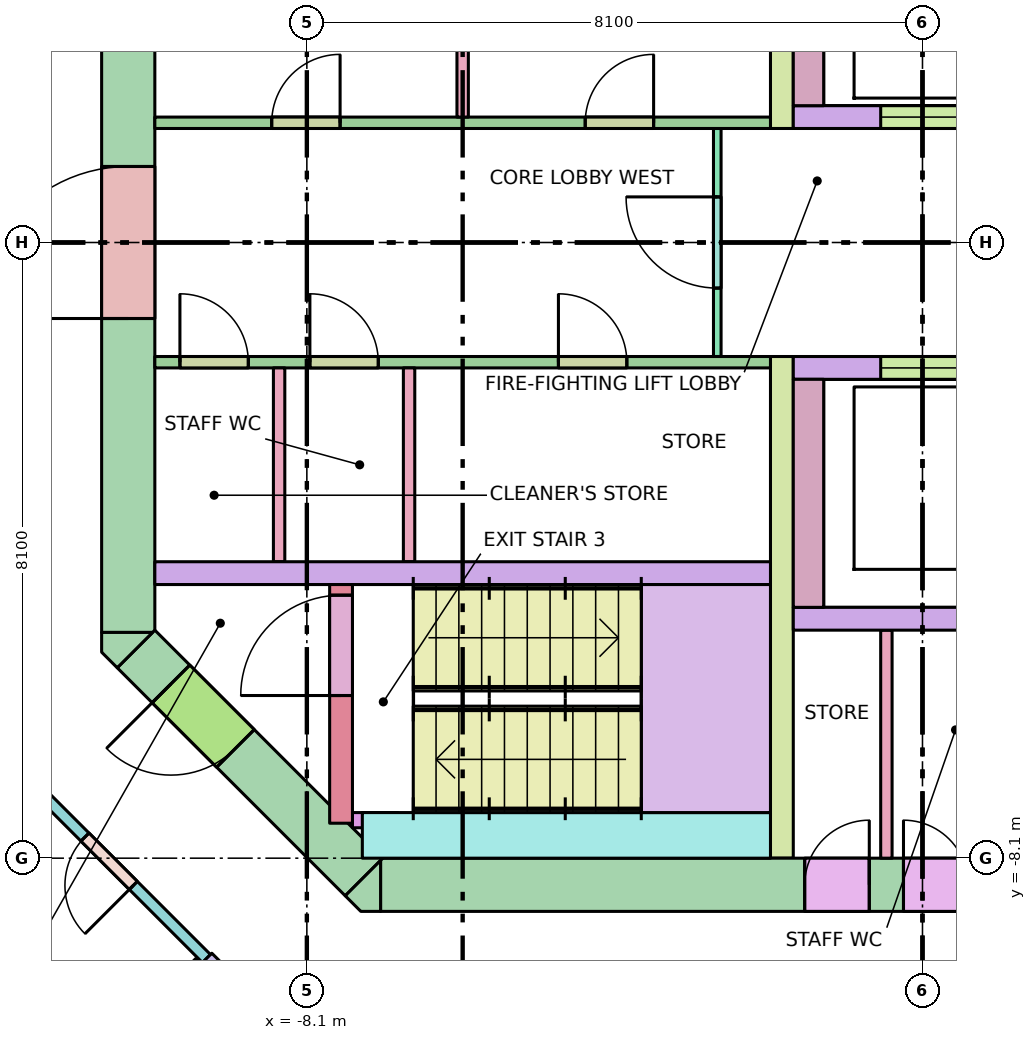
"""IFC4 building model, lengths in metres.
Left out: names, types, materials, properties, quantities, classifications, styles, units other than length and angle.
Written with IfcOpenShell. Run it as: python <this file> out.ifc"""

import sys

from ifc_helpers import new_model, si_unit, direction, frame, frame_2d, origin, place, context, subcontext, project, spatial, polyline, rectangle, outline, extrude, element, fill, save


model = new_model("IFC4")
c1 = context("Model", 3, precision=1e-05, world=origin(), true_north=direction((0.0, 1.0)))
c2 = subcontext(c1, "Body", "Model", "MODEL_VIEW")
j1 = project(units=[si_unit("LENGTHUNIT", "METRE"), si_unit("PLANEANGLEUNIT", "RADIAN")], contexts=[c1])
p1 = place(None, origin())
s1 = spatial("IfcSite", under=j1, at=p1, CompositionType="ELEMENT")
p2 = place(p1, origin())
s2 = spatial("IfcBuilding", under=s1, at=p2, CompositionType="ELEMENT")
p3 = place(p2, frame((0.0, 0.0, 215.0)))
s3 = spatial("IfcBuildingStorey", under=s2, at=p3, CompositionType="ELEMENT", Elevation=215.0)
p4 = place(p3, frame((-7.13, -8.45, -0.28), z_axis=(0.0, 0.0, 1.0), x_axis=(1.0, 0.0, 0.0)))
e1 = element("IfcWall", 1, at=p4, inside=s3, PredefinedType="SHEAR", context=c2, shape_type="SweptSolid", body=[
    extrude(rectangle(XDim=14.26, YDim=0.7, at=frame_2d((7.13, 0.0))), origin(), (0.0, 0.0, 1.0), 3.7),
])
p5 = place(p4, frame((8.08, 0.0, 0.28)))
e2 = element("IfcOpeningElement", 2, at=p5, cuts=e1, PredefinedType="OPENING", context=c2, shape_type="SweptSolid", body=[
    extrude(rectangle(XDim=0.7, YDim=2.1, at=frame_2d((0.35, 1.05))), frame((0.0, 0.36, 0.0), z_axis=(0.0, -1.0, 0.0), x_axis=(1.0, 0.0, 0.0)), (0.0, 0.0, 1.0), 0.72),
])
p6 = place(p4, frame((5.58, 0.0, 0.28)))
e3 = element("IfcOpeningElement", 3, at=p6, cuts=e1, PredefinedType="OPENING", context=c2, shape_type="SweptSolid", body=[
    extrude(rectangle(XDim=0.85, YDim=2.1, at=frame_2d((0.425, 1.05))), frame((0.0, 0.36, 0.0), z_axis=(0.0, -1.0, 0.0), x_axis=(1.0, 0.0, 0.0)), (0.0, 0.0, 1.0), 0.72),
])
p7 = place(p4, frame((6.88, 0.0, 0.28)))
e4 = element("IfcOpeningElement", 4, at=p7, cuts=e1, PredefinedType="OPENING", context=c2, shape_type="SweptSolid", body=[
    extrude(rectangle(XDim=0.85, YDim=2.1, at=frame_2d((0.425, 1.05))), frame((0.0, 0.36, 0.0), z_axis=(0.0, -1.0, 0.0), x_axis=(1.0, 0.0, 0.0)), (0.0, 0.0, 1.0), 0.72),
])
p8 = place(p4, frame((9.521, 0.0, 0.28)))
e5 = element("IfcOpeningElement", 5, at=p8, cuts=e1, PredefinedType="OPENING", context=c2, shape_type="SweptSolid", body=[
    extrude(rectangle(XDim=0.9, YDim=2.1, at=frame_2d((0.45, 1.05))), frame((0.0, 0.36, 0.0), z_axis=(0.0, -1.0, 0.0), x_axis=(1.0, 0.0, 0.0)), (0.0, 0.0, 1.0), 0.72),
])
p9 = place(p4, frame((11.278, 0.0, 0.28)))
e6 = element("IfcOpeningElement", 6, at=p9, cuts=e1, PredefinedType="OPENING", context=c2, shape_type="SweptSolid", body=[
    extrude(rectangle(XDim=0.9, YDim=2.1, at=frame_2d((0.45, 1.05))), frame((0.0, 0.36, 0.0), z_axis=(0.0, -1.0, 0.0), x_axis=(1.0, 0.0, 0.0)), (0.0, 0.0, 1.0), 0.72),
])
p10 = place(p4, frame((12.84, 0.0, 0.28)))
e7 = element("IfcOpeningElement", 7, at=p10, cuts=e1, PredefinedType="OPENING", context=c2, shape_type="SweptSolid", body=[
    extrude(rectangle(XDim=0.9, YDim=2.1, at=frame_2d((0.45, 1.05))), frame((0.0, 0.36, 0.0), z_axis=(0.0, -1.0, 0.0), x_axis=(1.0, 0.0, 0.0)), (0.0, 0.0, 1.0), 0.72),
])
p11 = place(p3, frame((-10.45, -5.13, -0.28), z_axis=(0.0, 0.0, 1.0), x_axis=(0.0, 1.0, 0.0)))
e8 = element("IfcWall", 8, at=p11, inside=s3, PredefinedType="SHEAR", context=c2, shape_type="SweptSolid", body=[
    extrude(rectangle(XDim=10.26, YDim=0.7, at=frame_2d((5.13, 0.0))), origin(), (0.0, 0.0, 1.0), 3.7),
])
p12 = place(p11, frame((4.13, 0.0, 0.28)))
e9 = element("IfcOpeningElement", 9, at=p12, cuts=e8, PredefinedType="OPENING", context=c2, shape_type="SweptSolid", body=[
    extrude(rectangle(XDim=2.0, YDim=2.1, at=frame_2d((1.0, 1.05))), frame((0.0, 0.36, 0.0), z_axis=(0.0, -1.0, 0.0), x_axis=(1.0, 0.0, 0.0)), (0.0, 0.0, 1.0), 0.72),
])
p13 = place(p3, frame((-7.347, -8.347, -0.28), z_axis=(0.0, 0.0, 1.0), x_axis=(-0.707106781187, 0.707106781187, 0.0)))
e10 = element("IfcWall", 10, at=p13, inside=s3, PredefinedType="SHEAR", context=c2, shape_type="SweptSolid", body=[
    extrude(rectangle(XDim=4.243, YDim=0.7, at=frame_2d((2.121, 0.0))), origin(), (0.0, 0.0, 1.0), 3.7),
])
p14 = place(p13, frame((2.393, 0.0, 0.28)))
e11 = element("IfcOpeningElement", 11, at=p14, cuts=e10, PredefinedType="OPENING", context=c2, shape_type="SweptSolid", body=[
    extrude(rectangle(XDim=1.2, YDim=2.1, at=frame_2d((0.6, 1.05))), frame((0.0, 0.36, 0.0), z_axis=(0.0, -1.0, 0.0), x_axis=(1.0, 0.0, 0.0)), (0.0, 0.0, 1.0), 0.72),
])
p15 = place(p3, frame((0.0, 0.0, -0.28)))
e12 = element("IfcWall", 12, at=p15, inside=s3, PredefinedType="SHEAR", context=c2, shape_type="SweptSolid", body=[
    extrude(outline(polyline([(-7.39, -8.8), (-7.595, -8.595), (-7.595, -8.595), (-7.595, -8.595), (-7.13, -8.13), (-7.13, -8.8), (-7.13, -8.8), (-7.39, -8.8)])), origin(), (0.0, 0.0, 1.0), 3.7),
])
p16 = place(p3, frame((0.0, 0.0, -0.28)))
e13 = element("IfcWall", 13, at=p16, inside=s3, PredefinedType="SHEAR", context=c2, shape_type="SweptSolid", body=[
    extrude(outline(polyline([(-10.8, -5.39), (-10.8, -5.13), (-10.8, -5.13), (-10.13, -5.13), (-10.595, -5.595), (-10.595, -5.595), (-10.595, -5.595), (-10.8, -5.39)])), origin(), (0.0, 0.0, 1.0), 3.7),
])
p17 = place(p3, frame((-10.1, -4.35, 0.0), z_axis=(0.0, 0.0, 1.0), x_axis=(1.0, 0.0, 0.0)))
e14 = element("IfcWall", 14, at=p17, inside=s3, PredefinedType="SOLIDWALL", context=c2, shape_type="SweptSolid", body=[
    extrude(rectangle(XDim=8.1, YDim=0.3, at=frame_2d((4.05, 0.0))), origin(), (0.0, 0.0, 1.0), 3.42),
])
for number, where, z_axis, x_axis in (
    (15, (-1.85, 1.5, 0.0), (0.0, 0.0, 1.0), (0.0, 1.0, 0.0)),
    (16, (-1.85, -8.1, 0.0), (0.0, 0.0, 1.0), (0.0, 1.0, 0.0)),
):
    element("IfcWall", number, at=place(p3, frame(where, z_axis=z_axis, x_axis=x_axis)), inside=s3, PredefinedType="SHEAR", context=c2, shape_type="SweptSolid", body=[
        extrude(rectangle(XDim=6.6, YDim=0.3, at=frame_2d((3.3, 0.0))), origin(), (0.0, 0.0, 1.0), 3.42),
    ])
p18 = place(p3, frame((-1.7, 1.65, 0.0), z_axis=(0.0, 0.0, 1.0), x_axis=(1.0, 0.0, 0.0)))
e17 = element("IfcWall", 17, at=p18, inside=s3, PredefinedType="SOLIDWALL", context=c2, shape_type="SweptSolid", body=[
    extrude(rectangle(XDim=3.4, YDim=0.3, at=frame_2d((1.7, 0.0))), origin(), (0.0, 0.0, 1.0), 3.42),
])
p19 = place(p18, frame((1.15, 0.0, 0.0)))
e18 = element("IfcOpeningElement", 18, at=p19, cuts=e17, PredefinedType="OPENING", context=c2, shape_type="SweptSolid", body=[
    extrude(rectangle(XDim=1.1, YDim=2.1, at=frame_2d((0.55, 1.05))), frame((0.0, 0.16, 0.0), z_axis=(0.0, -1.0, 0.0), x_axis=(1.0, 0.0, 0.0)), (0.0, 0.0, 1.0), 0.32),
])
p20 = place(p3, frame((-1.7, -1.65, 0.0), z_axis=(0.0, 0.0, 1.0), x_axis=(1.0, 0.0, 0.0)))
e19 = element("IfcWall", 19, at=p20, inside=s3, PredefinedType="SOLIDWALL", context=c2, shape_type="SweptSolid", body=[
    extrude(rectangle(XDim=3.4, YDim=0.3, at=frame_2d((1.7, 0.0))), origin(), (0.0, 0.0, 1.0), 3.42),
])
p21 = place(p20, frame((1.15, 0.0, 0.0)))
e20 = element("IfcOpeningElement", 20, at=p21, cuts=e19, PredefinedType="OPENING", context=c2, shape_type="SweptSolid", body=[
    extrude(rectangle(XDim=1.1, YDim=2.1, at=frame_2d((0.55, 1.05))), frame((0.0, 0.16, 0.0), z_axis=(0.0, -1.0, 0.0), x_axis=(1.0, 0.0, 0.0)), (0.0, 0.0, 1.0), 0.32),
])
for number, where, z_axis, x_axis in (
    (21, (-1.5, 1.8, 0.0), (0.0, 0.0, 1.0), (0.0, 1.0, 0.0)),
    (22, (-1.5, -4.8, 0.0), (0.0, 0.0, 1.0), (0.0, 1.0, 0.0)),
):
    element("IfcWall", number, at=place(p3, frame(where, z_axis=z_axis, x_axis=x_axis)), inside=s3, PredefinedType="SOLIDWALL", context=c2, shape_type="SweptSolid", body=[
        extrude(rectangle(XDim=3.0, YDim=0.4, at=frame_2d((1.5, 0.0))), origin(), (0.0, 0.0, 1.0), 3.42),
    ])
p22 = place(p3, frame((-1.7, -4.95, 0.0), z_axis=(0.0, 0.0, 1.0), x_axis=(1.0, 0.0, 0.0)))
e23 = element("IfcWall", 23, at=p22, inside=s3, PredefinedType="SOLIDWALL", context=c2, shape_type="SweptSolid", body=[
    extrude(rectangle(XDim=3.4, YDim=0.3, at=frame_2d((1.7, 0.0))), origin(), (0.0, 0.0, 1.0), 3.42),
])
p23 = place(p3, frame((-7.65, -7.64, 0.0), z_axis=(0.0, 0.0, 1.0), x_axis=(0.0, 1.0, 0.0)))
e24 = element("IfcWall", 24, at=p23, inside=s3, PredefinedType="SHEAR", context=c2, shape_type="SweptSolid", body=[
    extrude(rectangle(XDim=3.14, YDim=0.3, at=frame_2d((1.57, 0.0))), origin(), (0.0, 0.0, 1.0), 3.42),
])
p24 = place(p23, frame((1.68, 0.0, 0.0)))
e25 = element("IfcOpeningElement", 25, at=p24, cuts=e24, PredefinedType="OPENING", context=c2, shape_type="SweptSolid", body=[
    extrude(rectangle(XDim=1.32, YDim=2.1, at=frame_2d((0.66, 1.05))), frame((0.0, 0.16, 0.0), z_axis=(0.0, -1.0, 0.0), x_axis=(1.0, 0.0, 0.0)), (0.0, 0.0, 1.0), 0.32),
])
p25 = place(p3, frame((-7.5, -7.6, 0.0), z_axis=(0.0, 0.0, 1.0), x_axis=(1.0, 0.0, 0.0)))
e26 = element("IfcWall", 26, at=p25, inside=s3, PredefinedType="SHEAR", context=c2, shape_type="SweptSolid", body=[
    extrude(rectangle(XDim=0.6, YDim=0.2, at=frame_2d((0.3, 0.0))), origin(), (0.0, 0.0, 1.0), 3.42),
])
p26 = place(p3, frame((-7.37, -7.8, 0.0), z_axis=(0.0, 0.0, 1.0), x_axis=(1.0, 0.0, 0.0)))
e27 = element("IfcWall", 27, at=p26, inside=s3, PredefinedType="SHEAR", context=c2, shape_type="SweptSolid", body=[
    extrude(rectangle(XDim=5.37, YDim=0.6, at=frame_2d((2.685, 0.0))), origin(), (0.0, 0.0, 1.0), 3.42),
])
p27 = place(p3, frame((-2.7, -1.5, 0.0), z_axis=(0.0, 0.0, 1.0), x_axis=(0.0, 1.0, 0.0)))
e28 = element("IfcWall", 28, at=p27, inside=s3, PredefinedType="PARTITIONING", context=c2, shape_type="SweptSolid", body=[
    extrude(rectangle(XDim=3.0, YDim=0.1, at=frame_2d((1.5, 0.0))), origin(), (0.0, 0.0, 1.0), 3.42),
])
p28 = place(p27, frame((0.9, 0.0, 0.0)))
e29 = element("IfcOpeningElement", 29, at=p28, cuts=e28, PredefinedType="OPENING", context=c2, shape_type="SweptSolid", body=[
    extrude(rectangle(XDim=1.2, YDim=2.1, at=frame_2d((0.6, 1.05))), frame((0.0, 0.06, 0.0), z_axis=(0.0, -1.0, 0.0), x_axis=(1.0, 0.0, 0.0)), (0.0, 0.0, 1.0), 0.12),
])
p29 = place(p3, frame((-0.475, -8.1, 0.0), z_axis=(0.0, 0.0, 1.0), x_axis=(0.0, 1.0, 0.0)))
e30 = element("IfcWall", 30, at=p29, inside=s3, PredefinedType="PARTITIONING", context=c2, shape_type="SweptSolid", body=[
    extrude(rectangle(XDim=3.0, YDim=0.15, at=frame_2d((1.5, 0.0))), origin(), (0.0, 0.0, 1.0), 3.42),
])
for number, where, z_axis, x_axis in (
    (31, (-6.05, 1.65, 0.0), (0.0, 0.0, 1.0), (0.0, 1.0, 0.0)),
    (32, (-8.465, -4.2, 0.0), (0.0, 0.0, 1.0), (0.0, 1.0, 0.0)),
    (33, (-6.755, -4.2, 0.0), (0.0, 0.0, 1.0), (0.0, 1.0, 0.0)),
):
    element("IfcWall", number, at=place(p3, frame(where, z_axis=z_axis, x_axis=x_axis)), inside=s3, PredefinedType="PARTITIONING", context=c2, shape_type="SweptSolid", body=[
        extrude(rectangle(XDim=2.55, YDim=0.15, at=frame_2d((1.275, 0.0))), origin(), (0.0, 0.0, 1.0), 3.42),
    ])
p30 = place(p3, frame((-10.1, 1.575, 0.0), z_axis=(0.0, 0.0, 1.0), x_axis=(1.0, 0.0, 0.0)))
e34 = element("IfcWall", 34, at=p30, inside=s3, PredefinedType="PARTITIONING", context=c2, shape_type="SweptSolid", body=[
    extrude(rectangle(XDim=8.1, YDim=0.15, at=frame_2d((4.05, 0.0))), origin(), (0.0, 0.0, 1.0), 3.42),
])
p31 = place(p30, frame((1.538, 0.0, 0.0)))
e35 = element("IfcOpeningElement", 35, at=p31, cuts=e34, PredefinedType="OPENING", context=c2, shape_type="SweptSolid", body=[
    extrude(rectangle(XDim=0.9, YDim=2.1, at=frame_2d((0.45, 1.05))), frame((0.0, 0.085, 0.0), z_axis=(0.0, -1.0, 0.0), x_axis=(1.0, 0.0, 0.0)), (0.0, 0.0, 1.0), 0.17),
])
p32 = place(p30, frame((5.663, 0.0, 0.0)))
e36 = element("IfcOpeningElement", 36, at=p32, cuts=e34, PredefinedType="OPENING", context=c2, shape_type="SweptSolid", body=[
    extrude(rectangle(XDim=0.9, YDim=2.1, at=frame_2d((0.45, 1.05))), frame((0.0, 0.085, 0.0), z_axis=(0.0, -1.0, 0.0), x_axis=(1.0, 0.0, 0.0)), (0.0, 0.0, 1.0), 0.17),
])
p33 = place(p3, frame((-10.1, -1.575, 0.0), z_axis=(0.0, 0.0, 1.0), x_axis=(1.0, 0.0, 0.0)))
e37 = element("IfcWall", 37, at=p33, inside=s3, PredefinedType="PARTITIONING", context=c2, shape_type="SweptSolid", body=[
    extrude(rectangle(XDim=8.1, YDim=0.15, at=frame_2d((4.05, 0.0))), origin(), (0.0, 0.0, 1.0), 3.42),
])
p34 = place(p33, frame((0.33, 0.0, 0.0)))
e38 = element("IfcOpeningElement", 38, at=p34, cuts=e37, PredefinedType="OPENING", context=c2, shape_type="SweptSolid", body=[
    extrude(rectangle(XDim=0.9, YDim=2.1, at=frame_2d((0.45, 1.05))), frame((0.0, 0.085, 0.0), z_axis=(0.0, -1.0, 0.0), x_axis=(1.0, 0.0, 0.0)), (0.0, 0.0, 1.0), 0.17),
])
p35 = place(p33, frame((2.04, 0.0, 0.0)))
e39 = element("IfcOpeningElement", 39, at=p35, cuts=e37, PredefinedType="OPENING", context=c2, shape_type="SweptSolid", body=[
    extrude(rectangle(XDim=0.9, YDim=2.1, at=frame_2d((0.45, 1.05))), frame((0.0, 0.085, 0.0), z_axis=(0.0, -1.0, 0.0), x_axis=(1.0, 0.0, 0.0)), (0.0, 0.0, 1.0), 0.17),
])
p36 = place(p33, frame((5.31, 0.0, 0.0)))
e40 = element("IfcOpeningElement", 40, at=p36, cuts=e37, PredefinedType="OPENING", context=c2, shape_type="SweptSolid", body=[
    extrude(rectangle(XDim=0.9, YDim=2.1, at=frame_2d((0.45, 1.05))), frame((0.0, 0.085, 0.0), z_axis=(0.0, -1.0, 0.0), x_axis=(1.0, 0.0, 0.0)), (0.0, 0.0, 1.0), 0.17),
])
p37 = place(p3, frame((-8.216, -10.625, 0.0), z_axis=(0.0, 0.0, 1.0), x_axis=(-0.70717842684, 0.707035128273, 0.0)))
e41 = element("IfcWall", 41, at=p37, inside=s3, PredefinedType="PARTITIONING", context=c2, shape_type="SweptSolid", body=[
    extrude(rectangle(XDim=1.704, YDim=0.2, at=frame_2d((0.852, 0.0))), origin(), (0.0, 0.0, 1.0), 2.52),
])
p38 = place(p37, frame((0.402, 0.0, 0.0)))
e42 = element("IfcOpeningElement", 42, at=p38, cuts=e41, PredefinedType="OPENING", context=c2, shape_type="SweptSolid", body=[
    extrude(rectangle(XDim=0.9, YDim=2.1, at=frame_2d((0.45, 1.05))), frame((0.0, 0.11, 0.0), z_axis=(0.0, -1.0, 0.0), x_axis=(1.0, 0.0, 0.0)), (0.0, 0.0, 1.0), 0.22),
])
p39 = place(p3, frame((-9.421, -9.421, 0.0), z_axis=(0.0, 0.0, 1.0), x_axis=(-0.707079950597, 0.707133610758, 0.0)))
e43 = element("IfcWall", 43, at=p39, inside=s3, PredefinedType="PARTITIONING", context=c2, shape_type="SweptSolid", body=[
    extrude(rectangle(XDim=4.55, YDim=0.15, at=frame_2d((2.275, 0.0))), origin(), (0.0, 0.0, 1.0), 2.52),
])
p40 = place(p39, frame((1.361, 0.0, 0.0)))
e44 = element("IfcOpeningElement", 44, at=p40, cuts=e43, PredefinedType="OPENING", context=c2, shape_type="SweptSolid", body=[
    extrude(rectangle(XDim=0.9, YDim=2.1, at=frame_2d((0.45, 1.05))), frame((0.0, 0.085, 0.0), z_axis=(0.0, -1.0, 0.0), x_axis=(1.0, 0.0, 0.0)), (0.0, 0.0, 1.0), 0.17),
])
p41 = place(p3, frame((-9.491, -9.491, 0.0), z_axis=(0.0, 0.0, 1.0), x_axis=(-0.707106781187, -0.707106781187, 0.0)))
e45 = element("IfcWall", 45, at=p41, inside=s3, PredefinedType="PARTITIONING", context=c2, shape_type="SweptSolid", body=[
    extrude(rectangle(XDim=5.914, YDim=0.2, at=frame_2d((2.957, 0.0))), origin(), (0.0, 0.0, 1.0), 2.52),
])
p42 = place(p19, origin())
e46 = element("IfcDoor", 46, at=p42, inside=s3, OperationType="DOUBLE_DOOR_SLIDING", PredefinedType="DOOR", context=c2, shape_type="SweptSolid", body=[
    extrude(rectangle(XDim=1.1, YDim=2.1, at=frame_2d((0.55, 1.05))), frame((0.0, 0.025, 0.0), z_axis=(0.0, -1.0, 0.0), x_axis=(1.0, 0.0, 0.0)), (0.0, 0.0, 1.0), 0.05),
])
fill(e18, e46)
p43 = place(p21, origin())
e47 = element("IfcDoor", 47, at=p43, inside=s3, OperationType="DOUBLE_DOOR_SLIDING", PredefinedType="DOOR", context=c2, shape_type="SweptSolid", body=[
    extrude(rectangle(XDim=1.1, YDim=2.1, at=frame_2d((0.55, 1.05))), frame((0.0, 0.025, 0.0), z_axis=(0.0, -1.0, 0.0), x_axis=(1.0, 0.0, 0.0)), (0.0, 0.0, 1.0), 0.05),
])
fill(e20, e47)
p44 = place(p24, origin())
e48 = element("IfcDoor", 48, at=p44, inside=s3, OperationType="DOUBLE_DOOR_SINGLE_SWING", PredefinedType="DOOR", context=c2, shape_type="SweptSolid", body=[
    extrude(rectangle(XDim=1.32, YDim=2.1, at=frame_2d((0.66, 1.05))), frame((0.0, 0.025, 0.0), z_axis=(0.0, -1.0, 0.0), x_axis=(1.0, 0.0, 0.0)), (0.0, 0.0, 1.0), 0.05),
])
fill(e25, e48)
p45 = place(p14, origin())
e49 = element("IfcDoor", 49, at=p45, inside=s3, OperationType="SINGLE_SWING_RIGHT", PredefinedType="DOOR", context=c2, shape_type="SweptSolid", body=[
    extrude(rectangle(XDim=1.2, YDim=2.1, at=frame_2d((0.6, 1.05))), frame((0.0, 0.025, 0.0), z_axis=(0.0, -1.0, 0.0), x_axis=(1.0, 0.0, 0.0)), (0.0, 0.0, 1.0), 0.05),
])
fill(e11, e49)
p46 = place(p12, origin())
e50 = element("IfcDoor", 50, at=p46, inside=s3, OperationType="DOUBLE_DOOR_SINGLE_SWING", PredefinedType="DOOR", context=c2, shape_type="SweptSolid", body=[
    extrude(rectangle(XDim=2.0, YDim=2.1, at=frame_2d((1.0, 1.05))), frame((0.0, 0.025, 0.0), z_axis=(0.0, -1.0, 0.0), x_axis=(1.0, 0.0, 0.0)), (0.0, 0.0, 1.0), 0.05),
])
fill(e9, e50)
p47 = place(p28, origin())
e51 = element("IfcDoor", 51, at=p47, inside=s3, OperationType="SINGLE_SWING_RIGHT", PredefinedType="DOOR", context=c2, shape_type="SweptSolid", body=[
    extrude(rectangle(XDim=1.2, YDim=2.1, at=frame_2d((0.6, 1.05))), frame((0.0, 0.025, 0.0), z_axis=(0.0, -1.0, 0.0), x_axis=(1.0, 0.0, 0.0)), (0.0, 0.0, 1.0), 0.05),
])
fill(e29, e51)
p48 = place(p6, origin())
e52 = element("IfcDoor", 52, at=p48, inside=s3, OperationType="SINGLE_SWING_RIGHT", PredefinedType="DOOR", context=c2, shape_type="SweptSolid", body=[
    extrude(rectangle(XDim=0.85, YDim=2.1, at=frame_2d((0.425, 1.05))), frame((0.0, 0.025, 0.0), z_axis=(0.0, -1.0, 0.0), x_axis=(1.0, 0.0, 0.0)), (0.0, 0.0, 1.0), 0.05),
])
fill(e3, e52)
p49 = place(p7, origin())
e53 = element("IfcDoor", 53, at=p49, inside=s3, OperationType="SINGLE_SWING_LEFT", PredefinedType="DOOR", context=c2, shape_type="SweptSolid", body=[
    extrude(rectangle(XDim=0.85, YDim=2.1, at=frame_2d((0.425, 1.05))), frame((0.0, 0.025, 0.0), z_axis=(0.0, -1.0, 0.0), x_axis=(1.0, 0.0, 0.0)), (0.0, 0.0, 1.0), 0.05),
])
fill(e4, e53)
p50 = place(p31, origin())
e54 = element("IfcDoor", 54, at=p50, inside=s3, OperationType="SINGLE_SWING_RIGHT", PredefinedType="DOOR", context=c2, shape_type="SweptSolid", body=[
    extrude(rectangle(XDim=0.9, YDim=2.1, at=frame_2d((0.45, 1.05))), frame((0.0, 0.025, 0.0), z_axis=(0.0, -1.0, 0.0), x_axis=(1.0, 0.0, 0.0)), (0.0, 0.0, 1.0), 0.05),
])
fill(e35, e54)
p51 = place(p32, origin())
e55 = element("IfcDoor", 55, at=p51, inside=s3, OperationType="SINGLE_SWING_RIGHT", PredefinedType="DOOR", context=c2, shape_type="SweptSolid", body=[
    extrude(rectangle(XDim=0.9, YDim=2.1, at=frame_2d((0.45, 1.05))), frame((0.0, 0.025, 0.0), z_axis=(0.0, -1.0, 0.0), x_axis=(1.0, 0.0, 0.0)), (0.0, 0.0, 1.0), 0.05),
])
fill(e36, e55)
p52 = place(p34, origin())
e56 = element("IfcDoor", 56, at=p52, inside=s3, OperationType="SINGLE_SWING_LEFT", PredefinedType="DOOR", context=c2, shape_type="SweptSolid", body=[
    extrude(rectangle(XDim=0.9, YDim=2.1, at=frame_2d((0.45, 1.05))), frame((0.0, 0.025, 0.0), z_axis=(0.0, -1.0, 0.0), x_axis=(1.0, 0.0, 0.0)), (0.0, 0.0, 1.0), 0.05),
])
fill(e38, e56)
p53 = place(p35, origin())
e57 = element("IfcDoor", 57, at=p53, inside=s3, OperationType="SINGLE_SWING_LEFT", PredefinedType="DOOR", context=c2, shape_type="SweptSolid", body=[
    extrude(rectangle(XDim=0.9, YDim=2.1, at=frame_2d((0.45, 1.05))), frame((0.0, 0.025, 0.0), z_axis=(0.0, -1.0, 0.0), x_axis=(1.0, 0.0, 0.0)), (0.0, 0.0, 1.0), 0.05),
])
fill(e39, e57)
p54 = place(p36, origin())
e58 = element("IfcDoor", 58, at=p54, inside=s3, OperationType="SINGLE_SWING_LEFT", PredefinedType="DOOR", context=c2, shape_type="SweptSolid", body=[
    extrude(rectangle(XDim=0.9, YDim=2.1, at=frame_2d((0.45, 1.05))), frame((0.0, 0.025, 0.0), z_axis=(0.0, -1.0, 0.0), x_axis=(1.0, 0.0, 0.0)), (0.0, 0.0, 1.0), 0.05),
])
fill(e40, e58)
p55 = place(p40, origin())
e59 = element("IfcDoor", 59, at=p55, inside=s3, OperationType="SINGLE_SWING_LEFT", PredefinedType="DOOR", context=c2, shape_type="SweptSolid", body=[
    extrude(rectangle(XDim=0.9, YDim=2.1, at=frame_2d((0.45, 1.05))), frame((0.0, 0.025, 0.0), z_axis=(0.0, -1.0, 0.0), x_axis=(1.0, 0.0, 0.0)), (0.0, 0.0, 1.0), 0.05),
])
fill(e44, e59)
save(model, sys.argv[1])
